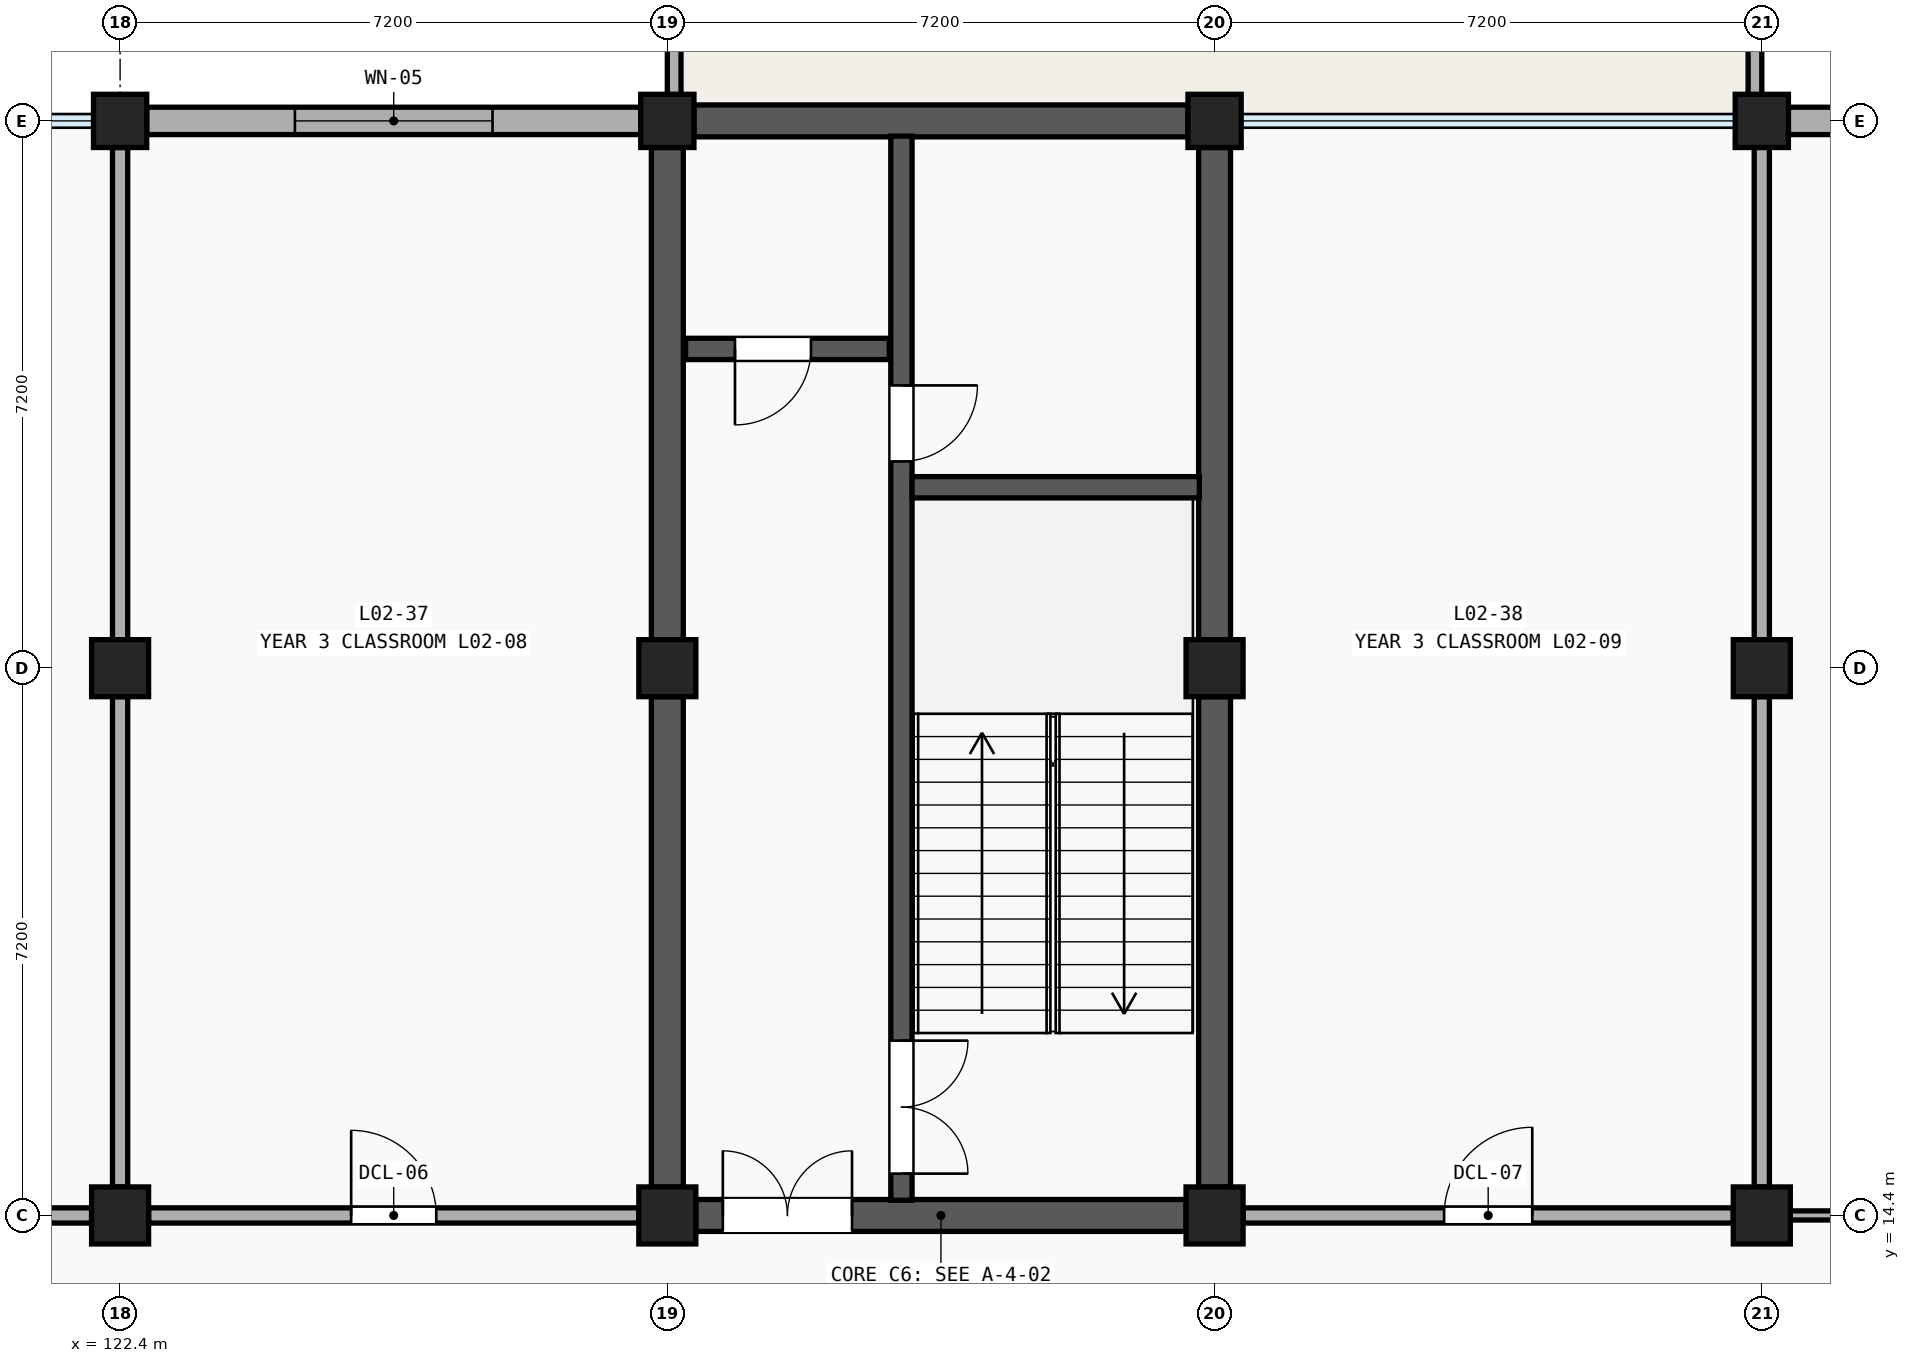
"""IFC4 building model, lengths in metres.
Left out: names, types, materials, properties, quantities, classifications, styles, units other than length and angle.
Written with IfcOpenShell. Run it as: python <this file> out.ifc"""

import sys

from ifc_helpers import new_model, si_unit, direction, frame, frame_2d, origin, origin_2d, place, context, subcontext, project, spatial, rectangle, extrude, element, fill, save


model = new_model("IFC4")
c1 = context("Model", 3, precision=1e-05, world=origin(), true_north=direction((0.0, 1.0)))
c2 = subcontext(c1, "Body", "Model", "MODEL_VIEW")
j1 = project(units=[si_unit("LENGTHUNIT", "METRE"), si_unit("PLANEANGLEUNIT", "RADIAN")], contexts=[c1])
p1 = place(None, origin())
s1 = spatial("IfcSite", under=j1, at=p1, CompositionType="ELEMENT")
p2 = place(p1, origin())
s2 = spatial("IfcBuilding", under=s1, at=p2, CompositionType="ELEMENT")
p3 = place(p2, frame((0.0, 0.0, 9.6)))
s3 = spatial("IfcBuildingStorey", under=s2, at=p3, CompositionType="ELEMENT", Elevation=9.6)
for number, where, z_axis, x_axis in (
    (1, (122.4, 14.4, 0.0), (0.0, 0.0, 1.0), (1.0, 0.0, 0.0)),
    (2, (122.4, 21.6, 0.0), (0.0, 0.0, 1.0), (1.0, 0.0, 0.0)),
):
    element("IfcColumn", number, at=place(p3, frame(where, z_axis=z_axis, x_axis=x_axis)), inside=s3, PredefinedType="COLUMN", context=c2, shape_type="SweptSolid", body=[
        extrude(rectangle(XDim=0.75, YDim=0.75, at=origin_2d()), origin(), (0.0, 0.0, 1.0), 4.8),
    ])
p4 = place(p3, frame((122.4, 28.8, 0.0), z_axis=(0.0, 0.0, 1.0), x_axis=(1.0, 0.0, 0.0)))
e3 = element("IfcColumn", 3, at=p4, inside=s3, PredefinedType="COLUMN", context=c2, shape_type="SweptSolid", body=[
    extrude(rectangle(XDim=0.7, YDim=0.7, at=origin_2d()), origin(), (0.0, 0.0, 1.0), 4.8),
])
for number, where, z_axis, x_axis in (
    (4, (129.6, 14.4, 0.0), (0.0, 0.0, 1.0), (1.0, 0.0, 0.0)),
    (5, (129.6, 21.6, 0.0), (0.0, 0.0, 1.0), (1.0, 0.0, 0.0)),
):
    element("IfcColumn", number, at=place(p3, frame(where, z_axis=z_axis, x_axis=x_axis)), inside=s3, PredefinedType="COLUMN", context=c2, shape_type="SweptSolid", body=[
        extrude(rectangle(XDim=0.75, YDim=0.75, at=origin_2d()), origin(), (0.0, 0.0, 1.0), 4.8),
    ])
p5 = place(p3, frame((129.6, 28.8, 0.0), z_axis=(0.0, 0.0, 1.0), x_axis=(1.0, 0.0, 0.0)))
e6 = element("IfcColumn", 6, at=p5, inside=s3, PredefinedType="COLUMN", context=c2, shape_type="SweptSolid", body=[
    extrude(rectangle(XDim=0.7, YDim=0.7, at=origin_2d()), origin(), (0.0, 0.0, 1.0), 4.8),
])
for number, where, z_axis, x_axis in (
    (7, (136.8, 14.4, 0.0), (0.0, 0.0, 1.0), (1.0, 0.0, 0.0)),
    (8, (136.8, 21.6, 0.0), (0.0, 0.0, 1.0), (1.0, 0.0, 0.0)),
):
    element("IfcColumn", number, at=place(p3, frame(where, z_axis=z_axis, x_axis=x_axis)), inside=s3, PredefinedType="COLUMN", context=c2, shape_type="SweptSolid", body=[
        extrude(rectangle(XDim=0.75, YDim=0.75, at=origin_2d()), origin(), (0.0, 0.0, 1.0), 4.8),
    ])
p6 = place(p3, frame((136.8, 28.8, 0.0), z_axis=(0.0, 0.0, 1.0), x_axis=(1.0, 0.0, 0.0)))
e9 = element("IfcColumn", 9, at=p6, inside=s3, PredefinedType="COLUMN", context=c2, shape_type="SweptSolid", body=[
    extrude(rectangle(XDim=0.7, YDim=0.7, at=origin_2d()), origin(), (0.0, 0.0, 1.0), 4.8),
])
for number, where, z_axis, x_axis in (
    (10, (144.0, 14.4, 0.0), (0.0, 0.0, 1.0), (1.0, 0.0, 0.0)),
    (11, (144.0, 21.6, 0.0), (0.0, 0.0, 1.0), (1.0, 0.0, 0.0)),
):
    element("IfcColumn", number, at=place(p3, frame(where, z_axis=z_axis, x_axis=x_axis)), inside=s3, PredefinedType="COLUMN", context=c2, shape_type="SweptSolid", body=[
        extrude(rectangle(XDim=0.75, YDim=0.75, at=origin_2d()), origin(), (0.0, 0.0, 1.0), 4.8),
    ])
p7 = place(p3, frame((144.0, 28.8, 0.0), z_axis=(0.0, 0.0, 1.0), x_axis=(1.0, 0.0, 0.0)))
e12 = element("IfcColumn", 12, at=p7, inside=s3, PredefinedType="COLUMN", context=c2, shape_type="SweptSolid", body=[
    extrude(rectangle(XDim=0.7, YDim=0.7, at=origin_2d()), origin(), (0.0, 0.0, 1.0), 4.8),
])
p8 = place(p3, frame((122.75, 28.8, 0.0), z_axis=(0.0, 0.0, 1.0), x_axis=(1.0, 0.0, 0.0)))
e13 = element("IfcWall", 13, at=p8, inside=s3, PredefinedType="SOLIDWALL", context=c2, shape_type="SweptSolid", body=[
    extrude(rectangle(XDim=6.5, YDim=0.36, at=frame_2d((3.25, 0.0))), origin(), (0.0, 0.0, 1.0), 3.88),
])
p9 = place(p8, frame((1.95, 0.0, 0.9)))
e14 = element("IfcOpeningElement", 14, at=p9, cuts=e13, PredefinedType="OPENING", context=c2, shape_type="SweptSolid", body=[
    extrude(rectangle(XDim=2.6, YDim=1.8, at=frame_2d((1.3, 0.9))), frame((0.0, 0.192, 0.0), z_axis=(0.0, -1.0, 0.0), x_axis=(1.0, 0.0, 0.0)), (0.0, 0.0, 1.0), 0.384),
])
p10 = place(p3, frame((144.35, 28.8, 0.0), z_axis=(0.0, 0.0, 1.0), x_axis=(1.0, 0.0, 0.0)))
e15 = element("IfcWall", 15, at=p10, inside=s3, PredefinedType="SOLIDWALL", context=c2, shape_type="SweptSolid", body=[
    extrude(rectangle(XDim=6.6, YDim=0.36, at=frame_2d((3.3, 0.0))), origin(), (0.0, 0.0, 1.0), 3.88),
])
p11 = place(p10, frame((1.7, 0.0, 0.9)))
e16 = element("IfcOpeningElement", 16, at=p11, cuts=e15, PredefinedType="OPENING", context=c2, shape_type="SweptSolid", body=[
    extrude(rectangle(XDim=3.2, YDim=1.8, at=frame_2d((1.6, 0.9))), frame((0.0, 0.192, 0.0), z_axis=(0.0, -1.0, 0.0), x_axis=(1.0, 0.0, 0.0)), (0.0, 0.0, 1.0), 0.384),
])
for number, where, z_axis, x_axis in (
    (17, (129.69, 28.89, 0.0), (0.0, 0.0, 1.0), (0.0, 1.0, 0.0)),
    (18, (143.91, 28.89, 0.0), (0.0, 0.0, 1.0), (0.0, 1.0, 0.0)),
):
    element("IfcWall", number, at=place(p3, frame(where, z_axis=z_axis, x_axis=x_axis)), inside=s3, PredefinedType="PARAPET", context=c2, shape_type="SweptSolid", body=[
        extrude(rectangle(XDim=7.02, YDim=0.18, at=frame_2d((3.51, 0.0))), origin(), (0.0, 0.0, 1.0), 0.95),
    ])
p12 = place(p3, frame((129.6, 14.775, 0.0), z_axis=(0.0, 0.0, 1.0), x_axis=(0.0, 1.0, 0.0)))
e19 = element("IfcWall", 19, at=p12, inside=s3, PredefinedType="SHEAR", context=c2, shape_type="SweptSolid", body=[
    extrude(rectangle(XDim=6.45, YDim=0.42, at=frame_2d((3.225, 0.0))), origin(), (0.0, 0.0, 1.0), 3.74),
])
p13 = place(p3, frame((129.6, 21.975, 0.0), z_axis=(0.0, 0.0, 1.0), x_axis=(0.0, 1.0, 0.0)))
e20 = element("IfcWall", 20, at=p13, inside=s3, PredefinedType="SHEAR", context=c2, shape_type="SweptSolid", body=[
    extrude(rectangle(XDim=6.475, YDim=0.42, at=frame_2d((3.237, 0.0))), origin(), (0.0, 0.0, 1.0), 3.74),
])
p14 = place(p3, frame((136.8, 14.775, 0.0), z_axis=(0.0, 0.0, 1.0), x_axis=(0.0, 1.0, 0.0)))
e21 = element("IfcWall", 21, at=p14, inside=s3, PredefinedType="SHEAR", context=c2, shape_type="SweptSolid", body=[
    extrude(rectangle(XDim=6.45, YDim=0.42, at=frame_2d((3.225, 0.0))), origin(), (0.0, 0.0, 1.0), 3.74),
])
p15 = place(p3, frame((136.8, 21.975, 0.0), z_axis=(0.0, 0.0, 1.0), x_axis=(0.0, 1.0, 0.0)))
e22 = element("IfcWall", 22, at=p15, inside=s3, PredefinedType="SHEAR", context=c2, shape_type="SweptSolid", body=[
    extrude(rectangle(XDim=6.475, YDim=0.42, at=frame_2d((3.237, 0.0))), origin(), (0.0, 0.0, 1.0), 3.74),
])
p16 = place(p3, frame((129.975, 14.4, 0.0), z_axis=(0.0, 0.0, 1.0), x_axis=(1.0, 0.0, 0.0)))
e23 = element("IfcWall", 23, at=p16, inside=s3, PredefinedType="SHEAR", context=c2, shape_type="SweptSolid", body=[
    extrude(rectangle(XDim=6.45, YDim=0.42, at=frame_2d((3.225, 0.0))), origin(), (0.0, 0.0, 1.0), 3.81),
])
p17 = place(p16, frame((0.355, 0.0, 0.0)))
e24 = element("IfcOpeningElement", 24, at=p17, cuts=e23, PredefinedType="OPENING", context=c2, shape_type="SweptSolid", body=[
    extrude(rectangle(XDim=1.7, YDim=2.25, at=frame_2d((0.85, 1.125))), frame((0.0, 0.222, 0.0), z_axis=(0.0, -1.0, 0.0), x_axis=(1.0, 0.0, 0.0)), (0.0, 0.0, 1.0), 0.444),
])
p18 = place(p3, frame((129.95, 28.8, 0.0), z_axis=(0.0, 0.0, 1.0), x_axis=(1.0, 0.0, 0.0)))
e25 = element("IfcWall", 25, at=p18, inside=s3, PredefinedType="SHEAR", context=c2, shape_type="SweptSolid", body=[
    extrude(rectangle(XDim=6.5, YDim=0.42, at=frame_2d((3.25, 0.0))), origin(), (0.0, 0.0, 1.0), 3.88),
])
p19 = place(p3, frame((132.68, 14.6, 0.0), z_axis=(0.0, 0.0, 1.0), x_axis=(0.0, 1.0, 0.0)))
e26 = element("IfcWall", 26, at=p19, inside=s3, PredefinedType="SHEAR", context=c2, shape_type="SweptSolid", body=[
    extrude(rectangle(XDim=14.0, YDim=0.28, at=frame_2d((7.0, 0.0))), origin(), (0.0, 0.0, 1.0), 4.51),
])
p20 = place(p19, frame((0.35, 0.0, 0.0)))
e27 = element("IfcOpeningElement", 27, at=p20, cuts=e26, PredefinedType="OPENING", context=c2, shape_type="SweptSolid", body=[
    extrude(rectangle(XDim=1.75, YDim=2.15, at=frame_2d((0.875, 1.075))), frame((0.0, 0.152, 0.0), z_axis=(0.0, -1.0, 0.0), x_axis=(1.0, 0.0, 0.0)), (0.0, 0.0, 1.0), 0.304),
])
p21 = place(p19, frame((9.72, 0.0, 0.0)))
e28 = element("IfcOpeningElement", 28, at=p21, cuts=e26, PredefinedType="OPENING", context=c2, shape_type="SweptSolid", body=[
    extrude(rectangle(XDim=1.0, YDim=2.15, at=frame_2d((0.5, 1.075))), frame((0.0, 0.152, 0.0), z_axis=(0.0, -1.0, 0.0), x_axis=(1.0, 0.0, 0.0)), (0.0, 0.0, 1.0), 0.304),
])
p22 = place(p3, frame((132.82, 23.98, 0.0), z_axis=(0.0, 0.0, 1.0), x_axis=(1.0, 0.0, 0.0)))
e29 = element("IfcWall", 29, at=p22, inside=s3, PredefinedType="SHEAR", context=c2, shape_type="SweptSolid", body=[
    extrude(rectangle(XDim=3.78, YDim=0.28, at=frame_2d((1.89, 0.0))), origin(), (0.0, 0.0, 1.0), 4.51),
])
p23 = place(p3, frame((129.84, 25.8, 0.0), z_axis=(0.0, 0.0, 1.0), x_axis=(1.0, 0.0, 0.0)))
e30 = element("IfcWall", 30, at=p23, inside=s3, PredefinedType="SHEAR", context=c2, shape_type="SweptSolid", body=[
    extrude(rectangle(XDim=2.68, YDim=0.28, at=frame_2d((1.34, 0.0))), origin(), (0.0, 0.0, 1.0), 4.51),
])
p24 = place(p23, frame((0.65, 0.0, 0.0)))
e31 = element("IfcOpeningElement", 31, at=p24, cuts=e30, PredefinedType="OPENING", context=c2, shape_type="SweptSolid", body=[
    extrude(rectangle(XDim=1.0, YDim=2.15, at=frame_2d((0.5, 1.075))), frame((0.0, 0.152, 0.0), z_axis=(0.0, -1.0, 0.0), x_axis=(1.0, 0.0, 0.0)), (0.0, 0.0, 1.0), 0.304),
])
p25 = place(p3, frame((115.575, 14.4, 0.0), z_axis=(0.0, 0.0, 1.0), x_axis=(1.0, 0.0, 0.0)))
e32 = element("IfcWall", 32, at=p25, inside=s3, PredefinedType="PARTITIONING", context=c2, shape_type="SweptSolid", body=[
    extrude(rectangle(XDim=6.45, YDim=0.2, at=frame_2d((3.225, 0.0))), origin(), (0.0, 0.0, 1.0), 3.74),
])
p26 = place(p25, frame((2.685, 0.0, 0.0)))
e33 = element("IfcOpeningElement", 33, at=p26, cuts=e32, PredefinedType="OPENING", context=c2, shape_type="SweptSolid", body=[
    extrude(rectangle(XDim=1.08, YDim=2.18, at=frame_2d((0.54, 1.09))), frame((0.0, 0.112, 0.0), z_axis=(0.0, -1.0, 0.0), x_axis=(1.0, 0.0, 0.0)), (0.0, 0.0, 1.0), 0.224),
])
p27 = place(p3, frame((122.4, 14.775, 0.0), z_axis=(0.0, 0.0, 1.0), x_axis=(0.0, 1.0, 0.0)))
e34 = element("IfcWall", 34, at=p27, inside=s3, PredefinedType="PARTITIONING", context=c2, shape_type="SweptSolid", body=[
    extrude(rectangle(XDim=6.45, YDim=0.2, at=frame_2d((3.225, 0.0))), origin(), (0.0, 0.0, 1.0), 3.74),
])
p28 = place(p3, frame((122.4, 21.975, 0.0), z_axis=(0.0, 0.0, 1.0), x_axis=(0.0, 1.0, 0.0)))
e35 = element("IfcWall", 35, at=p28, inside=s3, PredefinedType="PARTITIONING", context=c2, shape_type="SweptSolid", body=[
    extrude(rectangle(XDim=6.475, YDim=0.2, at=frame_2d((3.237, 0.0))), origin(), (0.0, 0.0, 1.0), 3.74),
])
p29 = place(p3, frame((122.775, 14.4, 0.0), z_axis=(0.0, 0.0, 1.0), x_axis=(1.0, 0.0, 0.0)))
e36 = element("IfcWall", 36, at=p29, inside=s3, PredefinedType="PARTITIONING", context=c2, shape_type="SweptSolid", body=[
    extrude(rectangle(XDim=6.45, YDim=0.2, at=frame_2d((3.225, 0.0))), origin(), (0.0, 0.0, 1.0), 3.74),
])
p30 = place(p29, frame((2.665, 0.0, 0.0)))
e37 = element("IfcOpeningElement", 37, at=p30, cuts=e36, PredefinedType="OPENING", context=c2, shape_type="SweptSolid", body=[
    extrude(rectangle(XDim=1.12, YDim=2.2, at=frame_2d((0.56, 1.1))), frame((0.0, 0.112, 0.0), z_axis=(0.0, -1.0, 0.0), x_axis=(1.0, 0.0, 0.0)), (0.0, 0.0, 1.0), 0.224),
])
p31 = place(p3, frame((137.175, 14.4, 0.0), z_axis=(0.0, 0.0, 1.0), x_axis=(1.0, 0.0, 0.0)))
e38 = element("IfcWall", 38, at=p31, inside=s3, PredefinedType="PARTITIONING", context=c2, shape_type="SweptSolid", body=[
    extrude(rectangle(XDim=6.45, YDim=0.2, at=frame_2d((3.225, 0.0))), origin(), (0.0, 0.0, 1.0), 3.74),
])
p32 = place(p31, frame((2.645, 0.0, 0.0)))
e39 = element("IfcOpeningElement", 39, at=p32, cuts=e38, PredefinedType="OPENING", context=c2, shape_type="SweptSolid", body=[
    extrude(rectangle(XDim=1.16, YDim=2.22, at=frame_2d((0.58, 1.11))), frame((0.0, 0.112, 0.0), z_axis=(0.0, -1.0, 0.0), x_axis=(1.0, 0.0, 0.0)), (0.0, 0.0, 1.0), 0.224),
])
p33 = place(p3, frame((144.0, 14.775, 0.0), z_axis=(0.0, 0.0, 1.0), x_axis=(0.0, 1.0, 0.0)))
e40 = element("IfcWall", 40, at=p33, inside=s3, PredefinedType="PARTITIONING", context=c2, shape_type="SweptSolid", body=[
    extrude(rectangle(XDim=6.45, YDim=0.2, at=frame_2d((3.225, 0.0))), origin(), (0.0, 0.0, 1.0), 3.74),
])
p34 = place(p3, frame((144.0, 21.975, 0.0), z_axis=(0.0, 0.0, 1.0), x_axis=(0.0, 1.0, 0.0)))
e41 = element("IfcWall", 41, at=p34, inside=s3, PredefinedType="PARTITIONING", context=c2, shape_type="SweptSolid", body=[
    extrude(rectangle(XDim=6.475, YDim=0.2, at=frame_2d((3.237, 0.0))), origin(), (0.0, 0.0, 1.0), 3.74),
])
p35 = place(p3, frame((144.375, 14.4, 0.0), z_axis=(0.0, 0.0, 1.0), x_axis=(1.0, 0.0, 0.0)))
e42 = element("IfcWall", 42, at=p35, inside=s3, PredefinedType="MOVABLE", context=c2, shape_type="SweptSolid", body=[
    extrude(rectangle(XDim=6.45, YDim=0.12, at=frame_2d((3.225, 0.0))), origin(), (0.0, 0.0, 1.0), 3.74),
])
p36 = place(p35, frame((2.625, 0.0, 0.0)))
e43 = element("IfcOpeningElement", 43, at=p36, cuts=e42, PredefinedType="OPENING", context=c2, shape_type="SweptSolid", body=[
    extrude(rectangle(XDim=1.2, YDim=2.24, at=frame_2d((0.6, 1.12))), frame((0.0, 0.072, 0.0), z_axis=(0.0, -1.0, 0.0), x_axis=(1.0, 0.0, 0.0)), (0.0, 0.0, 1.0), 0.144),
])
p37 = place(p9, origin())
e44 = element("IfcWindow", 44, at=p37, inside=s3, PartitioningType="SINGLE_PANEL", PredefinedType="WINDOW", context=c2, shape_type="SweptSolid", body=[
    extrude(rectangle(XDim=2.6, YDim=1.8, at=frame_2d((1.3, 0.9))), frame((0.0, 0.03, 0.0), z_axis=(0.0, -1.0, 0.0), x_axis=(1.0, 0.0, 0.0)), (0.0, 0.0, 1.0), 0.06),
])
fill(e14, e44)
p38 = place(p17, origin())
e45 = element("IfcDoor", 45, at=p38, inside=s3, OperationType="DOUBLE_DOOR_SINGLE_SWING", PredefinedType="DOOR", context=c2, shape_type="SweptSolid", body=[
    extrude(rectangle(XDim=1.7, YDim=2.25, at=frame_2d((0.85, 1.125))), frame((0.0, 0.025, 0.0), z_axis=(0.0, -1.0, 0.0), x_axis=(1.0, 0.0, 0.0)), (0.0, 0.0, 1.0), 0.05),
])
fill(e24, e45)
p39 = place(p20, frame((1.75, 0.0, 0.0), z_axis=(0.0, 0.0, 1.0), x_axis=(-1.0, 0.0, 0.0)))
e46 = element("IfcDoor", 46, at=p39, inside=s3, OperationType="DOUBLE_DOOR_SINGLE_SWING", PredefinedType="DOOR", context=c2, shape_type="SweptSolid", body=[
    extrude(rectangle(XDim=1.75, YDim=2.15, at=frame_2d((0.875, 1.075))), frame((0.0, 0.025, 0.0), z_axis=(0.0, -1.0, 0.0), x_axis=(1.0, 0.0, 0.0)), (0.0, 0.0, 1.0), 0.05),
])
fill(e27, e46)
p40 = place(p21, frame((1.0, 0.0, 0.0), z_axis=(0.0, 0.0, 1.0), x_axis=(-1.0, 0.0, 0.0)))
e47 = element("IfcDoor", 47, at=p40, inside=s3, OperationType="SINGLE_SWING_LEFT", PredefinedType="DOOR", context=c2, shape_type="SweptSolid", body=[
    extrude(rectangle(XDim=1.0, YDim=2.15, at=frame_2d((0.5, 1.075))), frame((0.0, 0.025, 0.0), z_axis=(0.0, -1.0, 0.0), x_axis=(1.0, 0.0, 0.0)), (0.0, 0.0, 1.0), 0.05),
])
fill(e28, e47)
p41 = place(p24, frame((1.0, 0.0, 0.0), z_axis=(0.0, 0.0, 1.0), x_axis=(-1.0, 0.0, 0.0)))
e48 = element("IfcDoor", 48, at=p41, inside=s3, OperationType="SINGLE_SWING_RIGHT", PredefinedType="DOOR", context=c2, shape_type="SweptSolid", body=[
    extrude(rectangle(XDim=1.0, YDim=2.15, at=frame_2d((0.5, 1.075))), frame((0.0, 0.025, 0.0), z_axis=(0.0, -1.0, 0.0), x_axis=(1.0, 0.0, 0.0)), (0.0, 0.0, 1.0), 0.05),
])
fill(e31, e48)
p42 = place(p30, origin())
e49 = element("IfcDoor", 49, at=p42, inside=s3, OperationType="SINGLE_SWING_LEFT", PredefinedType="DOOR", context=c2, shape_type="SweptSolid", body=[
    extrude(rectangle(XDim=1.12, YDim=2.2, at=frame_2d((0.56, 1.1))), frame((0.0, 0.025, 0.0), z_axis=(0.0, -1.0, 0.0), x_axis=(1.0, 0.0, 0.0)), (0.0, 0.0, 1.0), 0.05),
])
fill(e37, e49)
p43 = place(p32, origin())
e50 = element("IfcDoor", 50, at=p43, inside=s3, OperationType="SINGLE_SWING_RIGHT", PredefinedType="DOOR", context=c2, shape_type="SweptSolid", body=[
    extrude(rectangle(XDim=1.16, YDim=2.22, at=frame_2d((0.58, 1.11))), frame((0.0, 0.025, 0.0), z_axis=(0.0, -1.0, 0.0), x_axis=(1.0, 0.0, 0.0)), (0.0, 0.0, 1.0), 0.05),
])
fill(e39, e50)
save(model, sys.argv[1])
